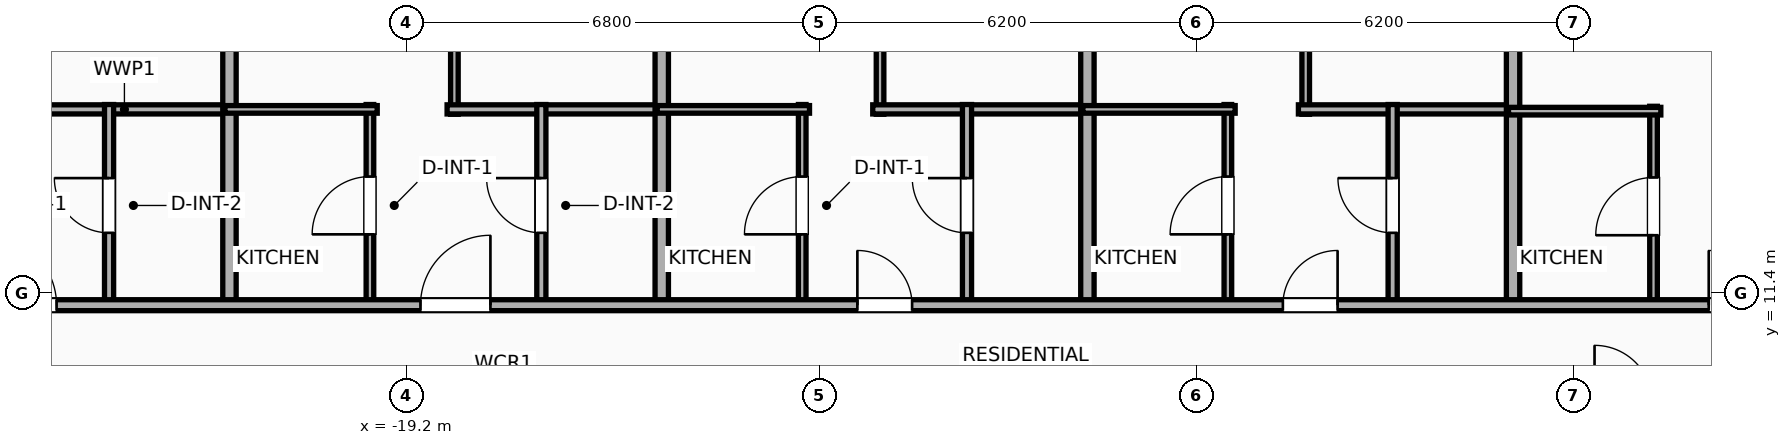
"""IFC4 building model, lengths in metres.
Left out: names, types, materials, properties, quantities, classifications, styles, units other than length and angle.
Written with IfcOpenShell. Run it as: python <this file> out.ifc"""

import sys

from ifc_helpers import new_model, si_unit, direction, frame, frame_2d, origin, place, context, subcontext, project, spatial, rectangle, extrude, element, fill, save


model = new_model("IFC4")
c1 = context("Model", 3, precision=1e-05, world=origin(), true_north=direction((0.0, 1.0)))
c2 = subcontext(c1, "Body", "Model", "MODEL_VIEW")
j1 = project(units=[si_unit("LENGTHUNIT", "METRE"), si_unit("PLANEANGLEUNIT", "RADIAN")], contexts=[c1])
p1 = place(None, origin())
s1 = spatial("IfcSite", under=j1, at=p1, CompositionType="ELEMENT")
p2 = place(p1, origin())
s2 = spatial("IfcBuilding", under=s1, at=p2, CompositionType="ELEMENT")
p3 = place(p2, frame((0.0, 0.0, 120.9)))
s3 = spatial("IfcBuildingStorey", under=s2, at=p3, CompositionType="ELEMENT", Elevation=120.9)
p4 = place(p3, frame((-25.639, 14.42, 0.0), z_axis=(0.0, 0.0, 1.0), x_axis=(1.0, 0.0, 0.0)))
e1 = element("IfcWall", 1, at=p4, inside=s3, PredefinedType="PLUMBINGWALL", context=c2, shape_type="SweptSolid", body=[
    extrude(rectangle(XDim=3.605, YDim=0.15, at=frame_2d((1.802, 0.0))), origin(), (0.0, 0.0, 1.0), 3.65),
])
p5 = place(p3, frame((-24.089, 11.18, 0.0), z_axis=(0.0, 0.0, 1.0), x_axis=(0.0, 1.0, 0.0)))
e2 = element("IfcWall", 2, at=p5, inside=s3, PredefinedType="PLUMBINGWALL", context=c2, shape_type="SweptSolid", body=[
    extrude(rectangle(XDim=3.32, YDim=0.15, at=frame_2d((1.66, 0.0))), origin(), (0.0, 0.0, 1.0), 3.65),
])
p6 = place(p5, frame((1.21, 0.0, 0.0)))
e3 = element("IfcOpeningElement", 3, at=p6, cuts=e2, PredefinedType="OPENING", context=c2, shape_type="SweptSolid", body=[
    extrude(rectangle(XDim=0.9, YDim=2.05, at=frame_2d((0.45, 1.025))), frame((0.0, 0.085, 0.0), z_axis=(0.0, -1.0, 0.0), x_axis=(1.0, 0.0, 0.0)), (0.0, 0.0, 1.0), 0.17),
])
p7 = place(p3, frame((-22.109, 11.12, 0.0), z_axis=(0.0, 0.0, 1.0), x_axis=(0.0, 1.0, 0.0)))
e4 = element("IfcWall", 4, at=p7, inside=s3, PredefinedType="PARTITIONING", context=c2, shape_type="SweptSolid", body=[
    extrude(rectangle(XDim=10.49, YDim=0.22, at=frame_2d((5.245, 0.0))), origin(), (0.0, 0.0, 1.0), 3.65),
])
p8 = place(p3, frame((-18.41, 14.34, 0.0), z_axis=(0.0, 0.0, 1.0), x_axis=(0.0, 1.0, 0.0)))
e5 = element("IfcWall", 5, at=p8, inside=s3, PredefinedType="PARTITIONING", context=c2, shape_type="SweptSolid", body=[
    extrude(rectangle(XDim=7.42, YDim=0.125, at=frame_2d((3.71, 0.0))), origin(), (0.0, 0.0, 1.0), 3.65),
])
p9 = place(p8, frame((1.331, 0.0, 0.0)))
e6 = element("IfcOpeningElement", 6, at=p9, cuts=e5, PredefinedType="OPENING", context=c2, shape_type="SweptSolid", body=[
    extrude(rectangle(XDim=0.9, YDim=2.05, at=frame_2d((0.45, 1.025))), frame((0.0, 0.073, 0.0), z_axis=(0.0, -1.0, 0.0), x_axis=(1.0, 0.0, 0.0)), (0.0, 0.0, 1.0), 0.145),
])
p10 = place(p3, frame((-18.53, 14.42, 0.0), z_axis=(0.0, 0.0, 1.0), x_axis=(1.0, 0.0, 0.0)))
e7 = element("IfcWall", 7, at=p10, inside=s3, PredefinedType="PLUMBINGWALL", context=c2, shape_type="SweptSolid", body=[
    extrude(rectangle(XDim=3.605, YDim=0.15, at=frame_2d((1.802, 0.0))), origin(), (0.0, 0.0, 1.0), 3.65),
])
p11 = place(p3, frame((-19.799, 11.18, 0.0), z_axis=(0.0, 0.0, 1.0), x_axis=(0.0, 1.0, 0.0)))
e8 = element("IfcWall", 8, at=p11, inside=s3, PredefinedType="PARTITIONING", context=c2, shape_type="SweptSolid", body=[
    extrude(rectangle(XDim=3.32, YDim=0.125, at=frame_2d((1.66, 0.0))), origin(), (0.0, 0.0, 1.0), 3.65),
])
p12 = place(p11, frame((1.185, 0.0, 0.0)))
e9 = element("IfcOpeningElement", 9, at=p12, cuts=e8, PredefinedType="OPENING", context=c2, shape_type="SweptSolid", body=[
    extrude(rectangle(XDim=0.95, YDim=2.05, at=frame_2d((0.475, 1.025))), frame((0.0, 0.073, 0.0), z_axis=(0.0, -1.0, 0.0), x_axis=(1.0, 0.0, 0.0)), (0.0, 0.0, 1.0), 0.145),
])
p13 = place(p3, frame((-22.184, 14.42, 0.0), z_axis=(0.0, 0.0, 1.0), x_axis=(1.0, 0.0, 0.0)))
e10 = element("IfcWall", 10, at=p13, inside=s3, PredefinedType="PARTITIONING", context=c2, shape_type="SweptSolid", body=[
    extrude(rectangle(XDim=2.505, YDim=0.125, at=frame_2d((1.252, 0.0))), origin(), (0.0, 0.0, 1.0), 3.65),
])
p14 = place(p3, frame((-16.98, 11.18, 0.0), z_axis=(0.0, 0.0, 1.0), x_axis=(0.0, 1.0, 0.0)))
e11 = element("IfcWall", 11, at=p14, inside=s3, PredefinedType="PLUMBINGWALL", context=c2, shape_type="SweptSolid", body=[
    extrude(rectangle(XDim=3.32, YDim=0.15, at=frame_2d((1.66, 0.0))), origin(), (0.0, 0.0, 1.0), 3.65),
])
p15 = place(p14, frame((1.21, 0.0, 0.0)))
e12 = element("IfcOpeningElement", 12, at=p15, cuts=e11, PredefinedType="OPENING", context=c2, shape_type="SweptSolid", body=[
    extrude(rectangle(XDim=0.9, YDim=2.05, at=frame_2d((0.45, 1.025))), frame((0.0, 0.085, 0.0), z_axis=(0.0, -1.0, 0.0), x_axis=(1.0, 0.0, 0.0)), (0.0, 0.0, 1.0), 0.17),
])
p16 = place(p3, frame((-15.0, 11.12, 0.0), z_axis=(0.0, 0.0, 1.0), x_axis=(0.0, 1.0, 0.0)))
e13 = element("IfcWall", 13, at=p16, inside=s3, PredefinedType="PARTITIONING", context=c2, shape_type="SweptSolid", body=[
    extrude(rectangle(XDim=10.49, YDim=0.22, at=frame_2d((5.245, 0.0))), origin(), (0.0, 0.0, 1.0), 3.04),
])
p17 = place(p3, frame((-11.41, 14.34, 0.0), z_axis=(0.0, 0.0, 1.0), x_axis=(0.0, 1.0, 0.0)))
e14 = element("IfcWall", 14, at=p17, inside=s3, PredefinedType="PARTITIONING", context=c2, shape_type="SweptSolid", body=[
    extrude(rectangle(XDim=7.42, YDim=0.125, at=frame_2d((3.71, 0.0))), origin(), (0.0, 0.0, 1.0), 3.65),
])
p18 = place(p17, frame((1.331, 0.0, 0.0)))
e15 = element("IfcOpeningElement", 15, at=p18, cuts=e14, PredefinedType="OPENING", context=c2, shape_type="SweptSolid", body=[
    extrude(rectangle(XDim=0.9, YDim=2.05, at=frame_2d((0.45, 1.025))), frame((0.0, 0.073, 0.0), z_axis=(0.0, -1.0, 0.0), x_axis=(1.0, 0.0, 0.0)), (0.0, 0.0, 1.0), 0.145),
])
p19 = place(p3, frame((-11.53, 14.42, 0.0), z_axis=(0.0, 0.0, 1.0), x_axis=(1.0, 0.0, 0.0)))
e16 = element("IfcWall", 16, at=p19, inside=s3, PredefinedType="PLUMBINGWALL", context=c2, shape_type="SweptSolid", body=[
    extrude(rectangle(XDim=3.605, YDim=0.15, at=frame_2d((1.802, 0.0))), origin(), (0.0, 0.0, 1.0), 3.65),
])
p20 = place(p3, frame((-12.69, 11.18, 0.0), z_axis=(0.0, 0.0, 1.0), x_axis=(0.0, 1.0, 0.0)))
e17 = element("IfcWall", 17, at=p20, inside=s3, PredefinedType="PARTITIONING", context=c2, shape_type="SweptSolid", body=[
    extrude(rectangle(XDim=3.32, YDim=0.125, at=frame_2d((1.66, 0.0))), origin(), (0.0, 0.0, 1.0), 3.65),
])
p21 = place(p20, frame((1.185, 0.0, 0.0)))
e18 = element("IfcOpeningElement", 18, at=p21, cuts=e17, PredefinedType="OPENING", context=c2, shape_type="SweptSolid", body=[
    extrude(rectangle(XDim=0.95, YDim=2.05, at=frame_2d((0.475, 1.025))), frame((0.0, 0.073, 0.0), z_axis=(0.0, -1.0, 0.0), x_axis=(1.0, 0.0, 0.0)), (0.0, 0.0, 1.0), 0.145),
])
p22 = place(p3, frame((-15.075, 14.42, 0.0), z_axis=(0.0, 0.0, 1.0), x_axis=(1.0, 0.0, 0.0)))
e19 = element("IfcWall", 19, at=p22, inside=s3, PredefinedType="PARTITIONING", context=c2, shape_type="SweptSolid", body=[
    extrude(rectangle(XDim=2.505, YDim=0.125, at=frame_2d((1.252, 0.0))), origin(), (0.0, 0.0, 1.0), 3.65),
])
p23 = place(p3, frame((-9.98, 11.18, 0.0), z_axis=(0.0, 0.0, 1.0), x_axis=(0.0, 1.0, 0.0)))
e20 = element("IfcWall", 20, at=p23, inside=s3, PredefinedType="PLUMBINGWALL", context=c2, shape_type="SweptSolid", body=[
    extrude(rectangle(XDim=3.32, YDim=0.15, at=frame_2d((1.66, 0.0))), origin(), (0.0, 0.0, 1.0), 3.65),
])
p24 = place(p23, frame((1.21, 0.0, 0.0)))
e21 = element("IfcOpeningElement", 21, at=p24, cuts=e20, PredefinedType="OPENING", context=c2, shape_type="SweptSolid", body=[
    extrude(rectangle(XDim=0.9, YDim=2.05, at=frame_2d((0.45, 1.025))), frame((0.0, 0.085, 0.0), z_axis=(0.0, -1.0, 0.0), x_axis=(1.0, 0.0, 0.0)), (0.0, 0.0, 1.0), 0.17),
])
p25 = place(p3, frame((-8.0, 11.12, 0.0), z_axis=(0.0, 0.0, 1.0), x_axis=(0.0, 1.0, 0.0)))
e22 = element("IfcWall", 22, at=p25, inside=s3, PredefinedType="PARTITIONING", context=c2, shape_type="SweptSolid", body=[
    extrude(rectangle(XDim=10.49, YDim=0.22, at=frame_2d((5.245, 0.0))), origin(), (0.0, 0.0, 1.0), 3.65),
])
p26 = place(p3, frame((-4.41, 14.34, 0.0), z_axis=(0.0, 0.0, 1.0), x_axis=(0.0, 1.0, 0.0)))
e23 = element("IfcWall", 23, at=p26, inside=s3, PredefinedType="PARTITIONING", context=c2, shape_type="SweptSolid", body=[
    extrude(rectangle(XDim=7.42, YDim=0.125, at=frame_2d((3.71, 0.0))), origin(), (0.0, 0.0, 1.0), 3.65),
])
p27 = place(p26, frame((1.331, 0.0, 0.0)))
e24 = element("IfcOpeningElement", 24, at=p27, cuts=e23, PredefinedType="OPENING", context=c2, shape_type="SweptSolid", body=[
    extrude(rectangle(XDim=0.9, YDim=2.05, at=frame_2d((0.45, 1.025))), frame((0.0, 0.073, 0.0), z_axis=(0.0, -1.0, 0.0), x_axis=(1.0, 0.0, 0.0)), (0.0, 0.0, 1.0), 0.145),
])
p28 = place(p3, frame((-4.53, 14.42, 0.0), z_axis=(0.0, 0.0, 1.0), x_axis=(1.0, 0.0, 0.0)))
e25 = element("IfcWall", 25, at=p28, inside=s3, PredefinedType="PLUMBINGWALL", context=c2, shape_type="SweptSolid", body=[
    extrude(rectangle(XDim=3.605, YDim=0.15, at=frame_2d((1.802, 0.0))), origin(), (0.0, 0.0, 1.0), 3.65),
])
p29 = place(p3, frame((-5.69, 11.18, 0.0), z_axis=(0.0, 0.0, 1.0), x_axis=(0.0, 1.0, 0.0)))
e26 = element("IfcWall", 26, at=p29, inside=s3, PredefinedType="PARTITIONING", context=c2, shape_type="SweptSolid", body=[
    extrude(rectangle(XDim=3.32, YDim=0.125, at=frame_2d((1.66, 0.0))), origin(), (0.0, 0.0, 1.0), 3.65),
])
p30 = place(p29, frame((1.185, 0.0, 0.0)))
e27 = element("IfcOpeningElement", 27, at=p30, cuts=e26, PredefinedType="OPENING", context=c2, shape_type="SweptSolid", body=[
    extrude(rectangle(XDim=0.95, YDim=2.05, at=frame_2d((0.475, 1.025))), frame((0.0, 0.073, 0.0), z_axis=(0.0, -1.0, 0.0), x_axis=(1.0, 0.0, 0.0)), (0.0, 0.0, 1.0), 0.145),
])
p31 = place(p3, frame((-8.075, 14.42, 0.0), z_axis=(0.0, 0.0, 1.0), x_axis=(1.0, 0.0, 0.0)))
e28 = element("IfcWall", 28, at=p31, inside=s3, PredefinedType="PARTITIONING", context=c2, shape_type="SweptSolid", body=[
    extrude(rectangle(XDim=2.505, YDim=0.125, at=frame_2d((1.252, 0.0))), origin(), (0.0, 0.0, 1.0), 3.65),
])
p32 = place(p3, frame((-2.98, 11.18, 0.0), z_axis=(0.0, 0.0, 1.0), x_axis=(0.0, 1.0, 0.0)))
e29 = element("IfcWall", 29, at=p32, inside=s3, PredefinedType="PLUMBINGWALL", context=c2, shape_type="SweptSolid", body=[
    extrude(rectangle(XDim=3.32, YDim=0.15, at=frame_2d((1.66, 0.0))), origin(), (0.0, 0.0, 1.0), 3.65),
])
p33 = place(p32, frame((1.21, 0.0, 0.0)))
e30 = element("IfcOpeningElement", 30, at=p33, cuts=e29, PredefinedType="OPENING", context=c2, shape_type="SweptSolid", body=[
    extrude(rectangle(XDim=0.9, YDim=2.05, at=frame_2d((0.45, 1.025))), frame((0.0, 0.085, 0.0), z_axis=(0.0, -1.0, 0.0), x_axis=(1.0, 0.0, 0.0)), (0.0, 0.0, 1.0), 0.17),
])
p34 = place(p3, frame((-1.0, 11.12, 0.0), z_axis=(0.0, 0.0, 1.0), x_axis=(0.0, 1.0, 0.0)))
e31 = element("IfcWall", 31, at=p34, inside=s3, PredefinedType="PARTITIONING", context=c2, shape_type="SweptSolid", body=[
    extrude(rectangle(XDim=10.49, YDim=0.22, at=frame_2d((5.245, 0.0))), origin(), (0.0, 0.0, 1.0), 3.65),
])
p35 = place(p3, frame((1.31, 11.18, 0.0), z_axis=(0.0, 0.0, 1.0), x_axis=(0.0, 1.0, 0.0)))
e32 = element("IfcWall", 32, at=p35, inside=s3, PredefinedType="PARTITIONING", context=c2, shape_type="SweptSolid", body=[
    extrude(rectangle(XDim=3.291, YDim=0.125, at=frame_2d((1.646, 0.0))), origin(), (0.0, 0.0, 1.0), 3.65),
])
p36 = place(p35, frame((1.17, 0.0, 0.0)))
e33 = element("IfcOpeningElement", 33, at=p36, cuts=e32, PredefinedType="OPENING", context=c2, shape_type="SweptSolid", body=[
    extrude(rectangle(XDim=0.95, YDim=2.05, at=frame_2d((0.475, 1.025))), frame((0.0, 0.073, 0.0), z_axis=(0.0, -1.0, 0.0), x_axis=(1.0, 0.0, 0.0)), (0.0, 0.0, 1.0), 0.145),
])
p37 = place(p3, frame((-1.075, 14.391, 0.0), z_axis=(0.0, 0.0, 1.0), x_axis=(1.0, 0.0, 0.0)))
e34 = element("IfcWall", 34, at=p37, inside=s3, PredefinedType="PARTITIONING", context=c2, shape_type="SweptSolid", body=[
    extrude(rectangle(XDim=2.505, YDim=0.125, at=frame_2d((1.252, 0.0))), origin(), (0.0, 0.0, 1.0), 3.65),
])
p38 = place(p3, frame((-29.21, 11.2, 0.0), z_axis=(0.0, 0.0, 1.0), x_axis=(1.0, 0.0, 0.0)))
e35 = element("IfcWall", 35, at=p38, inside=s3, PredefinedType="PARTITIONING", context=c2, shape_type="SweptSolid", body=[
    extrude(rectangle(XDim=62.42, YDim=0.18, at=frame_2d((31.21, 0.0))), origin(), (0.0, 0.0, 1.0), 3.65),
])
p39 = place(p38, frame((3.108, 0.0, 0.0)))
e36 = element("IfcOpeningElement", 36, at=p39, cuts=e35, PredefinedType="OPENING", context=c2, shape_type="SweptSolid", body=[
    extrude(rectangle(XDim=1.15, YDim=2.05, at=frame_2d((0.575, 1.025))), frame((0.0, 0.1, 0.0), z_axis=(0.0, -1.0, 0.0), x_axis=(1.0, 0.0, 0.0)), (0.0, 0.0, 1.0), 0.2),
])
p40 = place(p38, frame((10.242, 0.0, 0.0)))
e37 = element("IfcOpeningElement", 37, at=p40, cuts=e35, PredefinedType="OPENING", context=c2, shape_type="SweptSolid", body=[
    extrude(rectangle(XDim=1.15, YDim=2.05, at=frame_2d((0.575, 1.025))), frame((0.0, 0.1, 0.0), z_axis=(0.0, -1.0, 0.0), x_axis=(1.0, 0.0, 0.0)), (0.0, 0.0, 1.0), 0.2),
])
p41 = place(p38, frame((17.427, 0.0, 0.0)))
e38 = element("IfcOpeningElement", 38, at=p41, cuts=e35, PredefinedType="OPENING", context=c2, shape_type="SweptSolid", body=[
    extrude(rectangle(XDim=0.9, YDim=2.05, at=frame_2d((0.45, 1.025))), frame((0.0, 0.1, 0.0), z_axis=(0.0, -1.0, 0.0), x_axis=(1.0, 0.0, 0.0)), (0.0, 0.0, 1.0), 0.2),
])
p42 = place(p38, frame((24.424, 0.0, 0.0)))
e39 = element("IfcOpeningElement", 39, at=p42, cuts=e35, PredefinedType="OPENING", context=c2, shape_type="SweptSolid", body=[
    extrude(rectangle(XDim=0.9, YDim=2.05, at=frame_2d((0.45, 1.025))), frame((0.0, 0.1, 0.0), z_axis=(0.0, -1.0, 0.0), x_axis=(1.0, 0.0, 0.0)), (0.0, 0.0, 1.0), 0.2),
])
p43 = place(p38, frame((31.428, 0.0, 0.0)))
e40 = element("IfcOpeningElement", 40, at=p43, cuts=e35, PredefinedType="OPENING", context=c2, shape_type="SweptSolid", body=[
    extrude(rectangle(XDim=0.9, YDim=2.05, at=frame_2d((0.45, 1.025))), frame((0.0, 0.1, 0.0), z_axis=(0.0, -1.0, 0.0), x_axis=(1.0, 0.0, 0.0)), (0.0, 0.0, 1.0), 0.2),
])
p44 = place(p38, frame((38.425, 0.0, 0.0)))
e41 = element("IfcOpeningElement", 41, at=p44, cuts=e35, PredefinedType="OPENING", context=c2, shape_type="SweptSolid", body=[
    extrude(rectangle(XDim=0.9, YDim=2.05, at=frame_2d((0.45, 1.025))), frame((0.0, 0.1, 0.0), z_axis=(0.0, -1.0, 0.0), x_axis=(1.0, 0.0, 0.0)), (0.0, 0.0, 1.0), 0.2),
])
p45 = place(p38, frame((45.298, 0.0, 0.0)))
e42 = element("IfcOpeningElement", 42, at=p45, cuts=e35, PredefinedType="OPENING", context=c2, shape_type="SweptSolid", body=[
    extrude(rectangle(XDim=0.9, YDim=2.05, at=frame_2d((0.45, 1.025))), frame((0.0, 0.1, 0.0), z_axis=(0.0, -1.0, 0.0), x_axis=(1.0, 0.0, 0.0)), (0.0, 0.0, 1.0), 0.2),
])
p46 = place(p38, frame((52.033, 0.0, 0.0)))
e43 = element("IfcOpeningElement", 43, at=p46, cuts=e35, PredefinedType="OPENING", context=c2, shape_type="SweptSolid", body=[
    extrude(rectangle(XDim=0.9, YDim=2.05, at=frame_2d((0.45, 1.025))), frame((0.0, 0.1, 0.0), z_axis=(0.0, -1.0, 0.0), x_axis=(1.0, 0.0, 0.0)), (0.0, 0.0, 1.0), 0.2),
])
p47 = place(p38, frame((58.805, 0.0, 0.0)))
e44 = element("IfcOpeningElement", 44, at=p47, cuts=e35, PredefinedType="OPENING", context=c2, shape_type="SweptSolid", body=[
    extrude(rectangle(XDim=0.9, YDim=2.05, at=frame_2d((0.45, 1.025))), frame((0.0, 0.1, 0.0), z_axis=(0.0, -1.0, 0.0), x_axis=(1.0, 0.0, 0.0)), (0.0, 0.0, 1.0), 0.2),
])
p48 = place(p6, origin())
e45 = element("IfcDoor", 45, at=p48, inside=s3, OperationType="SINGLE_SWING_RIGHT", PredefinedType="DOOR", context=c2, shape_type="SweptSolid", body=[
    extrude(rectangle(XDim=0.9, YDim=2.05, at=frame_2d((0.45, 1.025))), frame((0.0, 0.025, 0.0), z_axis=(0.0, -1.0, 0.0), x_axis=(1.0, 0.0, 0.0)), (0.0, 0.0, 1.0), 0.05),
])
fill(e3, e45)
p49 = place(p12, origin())
e46 = element("IfcDoor", 46, at=p49, inside=s3, OperationType="SINGLE_SWING_LEFT", PredefinedType="DOOR", context=c2, shape_type="SweptSolid", body=[
    extrude(rectangle(XDim=0.95, YDim=2.05, at=frame_2d((0.475, 1.025))), frame((0.0, 0.025, 0.0), z_axis=(0.0, -1.0, 0.0), x_axis=(1.0, 0.0, 0.0)), (0.0, 0.0, 1.0), 0.05),
])
fill(e9, e46)
p50 = place(p15, origin())
e47 = element("IfcDoor", 47, at=p50, inside=s3, OperationType="SINGLE_SWING_RIGHT", PredefinedType="DOOR", context=c2, shape_type="SweptSolid", body=[
    extrude(rectangle(XDim=0.9, YDim=2.05, at=frame_2d((0.45, 1.025))), frame((0.0, 0.025, 0.0), z_axis=(0.0, -1.0, 0.0), x_axis=(1.0, 0.0, 0.0)), (0.0, 0.0, 1.0), 0.05),
])
fill(e12, e47)
p51 = place(p21, origin())
e48 = element("IfcDoor", 48, at=p51, inside=s3, OperationType="SINGLE_SWING_LEFT", PredefinedType="DOOR", context=c2, shape_type="SweptSolid", body=[
    extrude(rectangle(XDim=0.95, YDim=2.05, at=frame_2d((0.475, 1.025))), frame((0.0, 0.025, 0.0), z_axis=(0.0, -1.0, 0.0), x_axis=(1.0, 0.0, 0.0)), (0.0, 0.0, 1.0), 0.05),
])
fill(e18, e48)
p52 = place(p24, origin())
e49 = element("IfcDoor", 49, at=p52, inside=s3, OperationType="SINGLE_SWING_RIGHT", PredefinedType="DOOR", context=c2, shape_type="SweptSolid", body=[
    extrude(rectangle(XDim=0.9, YDim=2.05, at=frame_2d((0.45, 1.025))), frame((0.0, 0.025, 0.0), z_axis=(0.0, -1.0, 0.0), x_axis=(1.0, 0.0, 0.0)), (0.0, 0.0, 1.0), 0.05),
])
fill(e21, e49)
p53 = place(p30, origin())
e50 = element("IfcDoor", 50, at=p53, inside=s3, OperationType="SINGLE_SWING_LEFT", PredefinedType="DOOR", context=c2, shape_type="SweptSolid", body=[
    extrude(rectangle(XDim=0.95, YDim=2.05, at=frame_2d((0.475, 1.025))), frame((0.0, 0.025, 0.0), z_axis=(0.0, -1.0, 0.0), x_axis=(1.0, 0.0, 0.0)), (0.0, 0.0, 1.0), 0.05),
])
fill(e27, e50)
p54 = place(p33, origin())
e51 = element("IfcDoor", 51, at=p54, inside=s3, OperationType="SINGLE_SWING_RIGHT", PredefinedType="DOOR", context=c2, shape_type="SweptSolid", body=[
    extrude(rectangle(XDim=0.9, YDim=2.05, at=frame_2d((0.45, 1.025))), frame((0.0, 0.025, 0.0), z_axis=(0.0, -1.0, 0.0), x_axis=(1.0, 0.0, 0.0)), (0.0, 0.0, 1.0), 0.05),
])
fill(e30, e51)
p55 = place(p36, origin())
e52 = element("IfcDoor", 52, at=p55, inside=s3, OperationType="SINGLE_SWING_LEFT", PredefinedType="DOOR", context=c2, shape_type="SweptSolid", body=[
    extrude(rectangle(XDim=0.95, YDim=2.05, at=frame_2d((0.475, 1.025))), frame((0.0, 0.025, 0.0), z_axis=(0.0, -1.0, 0.0), x_axis=(1.0, 0.0, 0.0)), (0.0, 0.0, 1.0), 0.05),
])
fill(e33, e52)
p56 = place(p39, origin())
e53 = element("IfcDoor", 53, at=p56, inside=s3, OperationType="SINGLE_SWING_LEFT", PredefinedType="DOOR", context=c2, shape_type="SweptSolid", body=[
    extrude(rectangle(XDim=1.15, YDim=2.05, at=frame_2d((0.575, 1.025))), frame((0.0, 0.025, 0.0), z_axis=(0.0, -1.0, 0.0), x_axis=(1.0, 0.0, 0.0)), (0.0, 0.0, 1.0), 0.05),
])
fill(e36, e53)
p57 = place(p40, origin())
e54 = element("IfcDoor", 54, at=p57, inside=s3, OperationType="SINGLE_SWING_RIGHT", PredefinedType="DOOR", context=c2, shape_type="SweptSolid", body=[
    extrude(rectangle(XDim=1.15, YDim=2.05, at=frame_2d((0.575, 1.025))), frame((0.0, 0.025, 0.0), z_axis=(0.0, -1.0, 0.0), x_axis=(1.0, 0.0, 0.0)), (0.0, 0.0, 1.0), 0.05),
])
fill(e37, e54)
p58 = place(p41, origin())
e55 = element("IfcDoor", 55, at=p58, inside=s3, OperationType="SINGLE_SWING_LEFT", PredefinedType="DOOR", context=c2, shape_type="SweptSolid", body=[
    extrude(rectangle(XDim=0.9, YDim=2.05, at=frame_2d((0.45, 1.025))), frame((0.0, 0.025, 0.0), z_axis=(0.0, -1.0, 0.0), x_axis=(1.0, 0.0, 0.0)), (0.0, 0.0, 1.0), 0.05),
])
fill(e38, e55)
p59 = place(p42, origin())
e56 = element("IfcDoor", 56, at=p59, inside=s3, OperationType="SINGLE_SWING_RIGHT", PredefinedType="DOOR", context=c2, shape_type="SweptSolid", body=[
    extrude(rectangle(XDim=0.9, YDim=2.05, at=frame_2d((0.45, 1.025))), frame((0.0, 0.025, 0.0), z_axis=(0.0, -1.0, 0.0), x_axis=(1.0, 0.0, 0.0)), (0.0, 0.0, 1.0), 0.05),
])
fill(e39, e56)
p60 = place(p43, origin())
e57 = element("IfcDoor", 57, at=p60, inside=s3, OperationType="SINGLE_SWING_LEFT", PredefinedType="DOOR", context=c2, shape_type="SweptSolid", body=[
    extrude(rectangle(XDim=0.9, YDim=2.05, at=frame_2d((0.45, 1.025))), frame((0.0, 0.025, 0.0), z_axis=(0.0, -1.0, 0.0), x_axis=(1.0, 0.0, 0.0)), (0.0, 0.0, 1.0), 0.05),
])
fill(e40, e57)
save(model, sys.argv[1])
